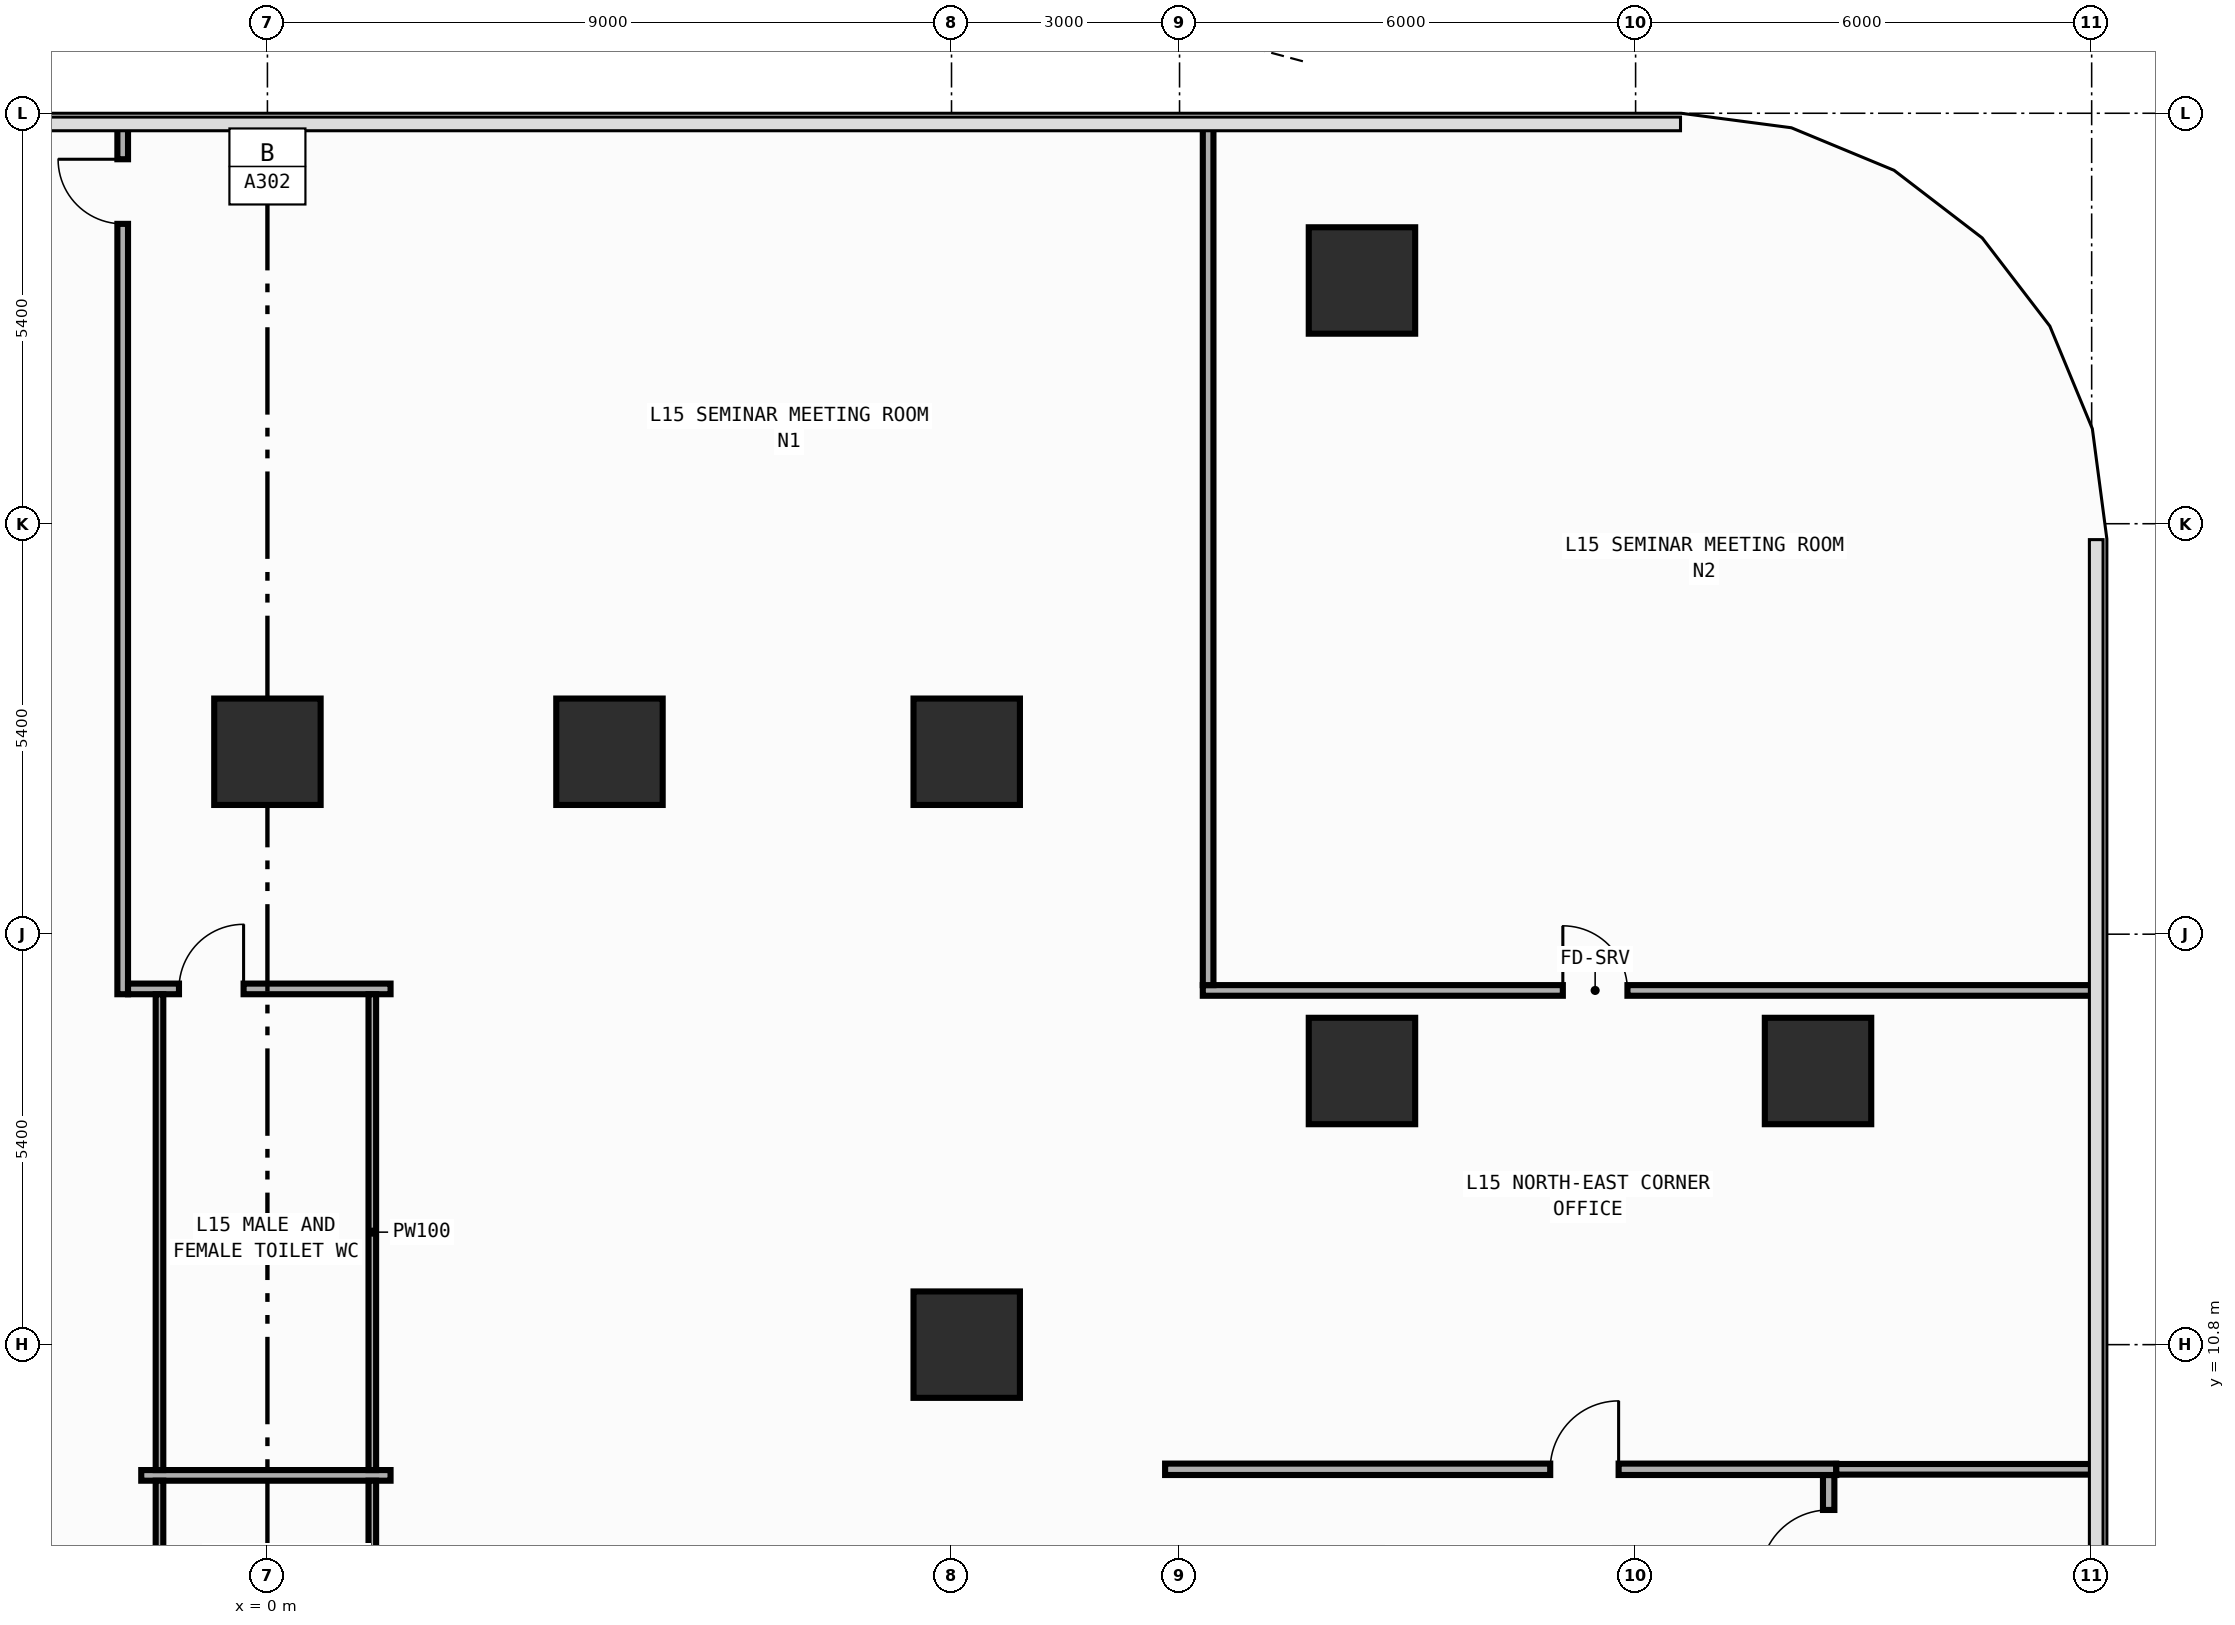
"""IFC4 building model, lengths in metres.
Left out: names, types, materials, properties, quantities, classifications, styles, units other than length and angle.
Written with IfcOpenShell. Run it as: python <this file> out.ifc"""

import sys

from ifc_helpers import new_model, si_unit, direction, frame, frame_2d, origin, origin_2d, place, context, subcontext, project, spatial, rectangle, extrude, element, fill, save


model = new_model("IFC4")
c1 = context("Model", 3, precision=1e-05, world=origin(), true_north=direction((0.0, 1.0)))
c2 = subcontext(c1, "Body", "Model", "MODEL_VIEW")
j1 = project(units=[si_unit("LENGTHUNIT", "METRE"), si_unit("PLANEANGLEUNIT", "RADIAN")], contexts=[c1])
p1 = place(None, origin())
s1 = spatial("IfcSite", under=j1, at=p1, CompositionType="ELEMENT")
p2 = place(p1, origin())
s2 = spatial("IfcBuilding", under=s1, at=p2, CompositionType="ELEMENT")
p3 = place(p2, frame((0.0, 0.0, 63.8)))
s3 = spatial("IfcBuildingStorey", under=s2, at=p3, CompositionType="ELEMENT", Elevation=63.8)
for number, where, z_axis, x_axis in (
    (1, (9.2, 10.8, 0.0), (0.0, 0.0, 1.0), (1.0, 0.0, 0.0)),
    (2, (9.2, 18.6, 0.0), (0.0, 0.0, 1.0), (1.0, 0.0, 0.0)),
    (3, (20.4, 14.4, 0.0), (0.0, 0.0, 1.0), (1.0, 0.0, 0.0)),
    (4, (14.4, 14.4, 0.0), (0.0, 0.0, 1.0), (1.0, 0.0, 0.0)),
    (5, (0.0, 18.6, 0.0), (0.0, 0.0, 1.0), (1.0, 0.0, 0.0)),
    (6, (4.5, 18.6, 0.0), (0.0, 0.0, 1.0), (1.0, 0.0, 0.0)),
    (7, (14.4, 24.8, 0.0), (0.0, 0.0, 1.0), (1.0, 0.0, 0.0)),
):
    element("IfcColumn", number, at=place(p3, frame(where, z_axis=z_axis, x_axis=x_axis)), inside=s3, PredefinedType="COLUMN", context=c2, shape_type="SweptSolid", body=[
        extrude(rectangle(XDim=1.4, YDim=1.4, at=origin_2d()), origin(), (0.0, 0.0, 1.0), 4.2),
    ])
p4 = place(p3, frame((20.54, 7.06, 0.0), z_axis=(0.0, 0.0, 1.0), x_axis=(0.0, 1.0, 0.0)))
e8 = element("IfcWall", 8, at=p4, inside=s3, PredefinedType="PARTITIONING", context=c2, shape_type="SweptSolid", body=[
    extrude(rectangle(XDim=2.025, YDim=0.15, at=frame_2d((1.012, 0.0))), origin(), (0.0, 0.0, 1.0), 3.94),
])
p5 = place(p4, frame((0.665, 0.0, 0.0)))
e9 = element("IfcOpeningElement", 9, at=p5, cuts=e8, PredefinedType="OPENING", context=c2, shape_type="SweptSolid", body=[
    extrude(rectangle(XDim=0.9, YDim=2.15, at=frame_2d((0.45, 1.075))), frame((0.0, 0.085, 0.0), z_axis=(0.0, -1.0, 0.0), x_axis=(1.0, 0.0, 0.0)), (0.0, 0.0, 1.0), 0.17),
])
p6 = place(p3, frame((11.81, 9.16, 0.0), z_axis=(0.0, 0.0, 1.0), x_axis=(1.0, 0.0, 0.0)))
e10 = element("IfcWall", 10, at=p6, inside=s3, PredefinedType="PARTITIONING", context=c2, shape_type="SweptSolid", body=[
    extrude(rectangle(XDim=8.83, YDim=0.15, at=frame_2d((4.415, 0.0))), origin(), (0.0, 0.0, 1.0), 3.94),
])
p7 = place(p6, frame((5.067, 0.0, 0.0)))
e11 = element("IfcOpeningElement", 11, at=p7, cuts=e10, PredefinedType="OPENING", context=c2, shape_type="SweptSolid", body=[
    extrude(rectangle(XDim=0.9, YDim=2.15, at=frame_2d((0.45, 1.075))), frame((0.0, 0.085, 0.0), z_axis=(0.0, -1.0, 0.0), x_axis=(1.0, 0.0, 0.0)), (0.0, 0.0, 1.0), 0.17),
])
p8 = place(p3, frame((20.64, 9.16, 0.0), z_axis=(0.0, 0.0, 1.0), x_axis=(1.0, 0.0, 0.0)))
e12 = element("IfcWall", 12, at=p8, inside=s3, PredefinedType="PARTITIONING", context=c2, shape_type="SweptSolid", body=[
    extrude(rectangle(XDim=3.415, YDim=0.14, at=frame_2d((1.708, 0.0))), origin(), (0.0, 0.0, 1.0), 3.94),
])
p9 = place(p3, frame((12.306, 15.46, 0.0), z_axis=(0.0, 0.0, 1.0), x_axis=(1.0, 0.0, 0.0)))
e13 = element("IfcWall", 13, at=p9, inside=s3, PredefinedType="PARTITIONING", context=c2, shape_type="SweptSolid", body=[
    extrude(rectangle(XDim=11.749, YDim=0.14, at=frame_2d((5.875, 0.0))), origin(), (0.0, 0.0, 1.0), 3.94),
])
p10 = place(p9, frame((4.737, 0.0, 0.0)))
e14 = element("IfcOpeningElement", 14, at=p10, cuts=e13, PredefinedType="OPENING", context=c2, shape_type="SweptSolid", body=[
    extrude(rectangle(XDim=0.85, YDim=2.1, at=frame_2d((0.425, 1.05))), frame((0.0, 0.08, 0.0), z_axis=(0.0, -1.0, 0.0), x_axis=(1.0, 0.0, 0.0)), (0.0, 0.0, 1.0), 0.16),
])
p11 = place(p3, frame((-1.904, 15.41, 0.0), z_axis=(0.0, 0.0, 1.0), x_axis=(0.0, 1.0, 0.0)))
e15 = element("IfcWall", 15, at=p11, inside=s3, PredefinedType="PARTITIONING", context=c2, shape_type="SweptSolid", body=[
    extrude(rectangle(XDim=11.445, YDim=0.14, at=frame_2d((5.723, 0.0))), origin(), (0.0, 0.0, 1.0), 3.94),
])
p12 = place(p11, frame((10.135, 0.0, 0.0)))
e16 = element("IfcOpeningElement", 16, at=p12, cuts=e15, PredefinedType="OPENING", context=c2, shape_type="SweptSolid", body=[
    extrude(rectangle(XDim=0.85, YDim=2.1, at=frame_2d((0.425, 1.05))), frame((0.0, 0.08, 0.0), z_axis=(0.0, -1.0, 0.0), x_axis=(1.0, 0.0, 0.0)), (0.0, 0.0, 1.0), 0.16),
])
p13 = place(p3, frame((12.376, 15.53, 0.0), z_axis=(0.0, 0.0, 1.0), x_axis=(0.0, 1.0, 0.0)))
e17 = element("IfcWall", 17, at=p13, inside=s3, PredefinedType="PARTITIONING", context=c2, shape_type="SweptSolid", body=[
    extrude(rectangle(XDim=11.325, YDim=0.14, at=frame_2d((5.663, 0.0))), origin(), (0.0, 0.0, 1.0), 3.94),
])
p14 = place(p3, frame((-1.834, 15.48, 0.0), z_axis=(0.0, 0.0, 1.0), x_axis=(1.0, 0.0, 0.0)))
e18 = element("IfcWall", 18, at=p14, inside=s3, PredefinedType="PARTITIONING", context=c2, shape_type="SweptSolid", body=[
    extrude(rectangle(XDim=3.454, YDim=0.14, at=frame_2d((1.727, 0.0))), origin(), (0.0, 0.0, 1.0), 3.94),
])
p15 = place(p14, frame((0.67, 0.0, 0.0)))
e19 = element("IfcOpeningElement", 19, at=p15, cuts=e18, PredefinedType="OPENING", context=c2, shape_type="SweptSolid", body=[
    extrude(rectangle(XDim=0.85, YDim=2.1, at=frame_2d((0.425, 1.05))), frame((0.0, 0.08, 0.0), z_axis=(0.0, -1.0, 0.0), x_axis=(1.0, 0.0, 0.0)), (0.0, 0.0, 1.0), 0.16),
])
p16 = place(p3, frame((-1.66, 9.08, 0.0), z_axis=(0.0, 0.0, 1.0), x_axis=(1.0, 0.0, 0.0)))
e20 = element("IfcWall", 20, at=p16, inside=s3, PredefinedType="PARTITIONING", context=c2, shape_type="SweptSolid", body=[
    extrude(rectangle(XDim=3.28, YDim=0.14, at=frame_2d((1.64, 0.0))), origin(), (0.0, 0.0, 1.0), 3.94),
])
for number, where, z_axis, x_axis in (
    (21, (1.38, 9.01, 0.0), (0.0, 0.0, 1.0), (0.0, -1.0, 0.0)),
    (22, (-1.42, 5.78, 0.0), (0.0, 0.0, 1.0), (0.0, 1.0, 0.0)),
):
    element("IfcWall", number, at=place(p3, frame(where, z_axis=z_axis, x_axis=x_axis)), inside=s3, PredefinedType="PARTITIONING", context=c2, shape_type="SweptSolid", body=[
        extrude(rectangle(XDim=3.23, YDim=0.1, at=frame_2d((1.615, 0.0))), origin(), (0.0, 0.0, 1.0), 3.94),
    ])
for number, where, z_axis, x_axis in (
    (23, (1.38, 15.41, 0.0), (0.0, 0.0, 1.0), (0.0, -1.0, 0.0)),
    (24, (-1.42, 9.15, 0.0), (0.0, 0.0, 1.0), (0.0, 1.0, 0.0)),
):
    element("IfcWall", number, at=place(p3, frame(where, z_axis=z_axis, x_axis=x_axis)), inside=s3, PredefinedType="PARTITIONING", context=c2, shape_type="SweptSolid", body=[
        extrude(rectangle(XDim=6.26, YDim=0.1, at=frame_2d((3.13, 0.0))), origin(), (0.0, 0.0, 1.0), 3.94),
    ])
p17 = place(p5, origin())
e25 = element("IfcDoor", 25, at=p17, inside=s3, OperationType="SINGLE_SWING_LEFT", PredefinedType="DOOR", context=c2, shape_type="SweptSolid", body=[
    extrude(rectangle(XDim=0.9, YDim=2.15, at=frame_2d((0.45, 1.075))), frame((0.0, 0.025, 0.0), z_axis=(0.0, -1.0, 0.0), x_axis=(1.0, 0.0, 0.0)), (0.0, 0.0, 1.0), 0.05),
])
fill(e9, e25)
p18 = place(p7, origin())
e26 = element("IfcDoor", 26, at=p18, inside=s3, OperationType="SINGLE_SWING_RIGHT", PredefinedType="DOOR", context=c2, shape_type="SweptSolid", body=[
    extrude(rectangle(XDim=0.9, YDim=2.15, at=frame_2d((0.45, 1.075))), frame((0.0, 0.025, 0.0), z_axis=(0.0, -1.0, 0.0), x_axis=(1.0, 0.0, 0.0)), (0.0, 0.0, 1.0), 0.05),
])
fill(e11, e26)
p19 = place(p10, origin())
e27 = element("IfcDoor", 27, at=p19, inside=s3, OperationType="SINGLE_SWING_LEFT", PredefinedType="DOOR", context=c2, shape_type="SweptSolid", body=[
    extrude(rectangle(XDim=0.85, YDim=2.1, at=frame_2d((0.425, 1.05))), frame((0.0, 0.025, 0.0), z_axis=(0.0, -1.0, 0.0), x_axis=(1.0, 0.0, 0.0)), (0.0, 0.0, 1.0), 0.05),
])
fill(e14, e27)
p20 = place(p12, origin())
e28 = element("IfcDoor", 28, at=p20, inside=s3, OperationType="SINGLE_SWING_RIGHT", PredefinedType="DOOR", context=c2, shape_type="SweptSolid", body=[
    extrude(rectangle(XDim=0.85, YDim=2.1, at=frame_2d((0.425, 1.05))), frame((0.0, 0.025, 0.0), z_axis=(0.0, -1.0, 0.0), x_axis=(1.0, 0.0, 0.0)), (0.0, 0.0, 1.0), 0.05),
])
fill(e16, e28)
p21 = place(p15, origin())
e29 = element("IfcDoor", 29, at=p21, inside=s3, OperationType="SINGLE_SWING_RIGHT", PredefinedType="DOOR", context=c2, shape_type="SweptSolid", body=[
    extrude(rectangle(XDim=0.85, YDim=2.1, at=frame_2d((0.425, 1.05))), frame((0.0, 0.025, 0.0), z_axis=(0.0, -1.0, 0.0), x_axis=(1.0, 0.0, 0.0)), (0.0, 0.0, 1.0), 0.05),
])
fill(e19, e29)
save(model, sys.argv[1])
